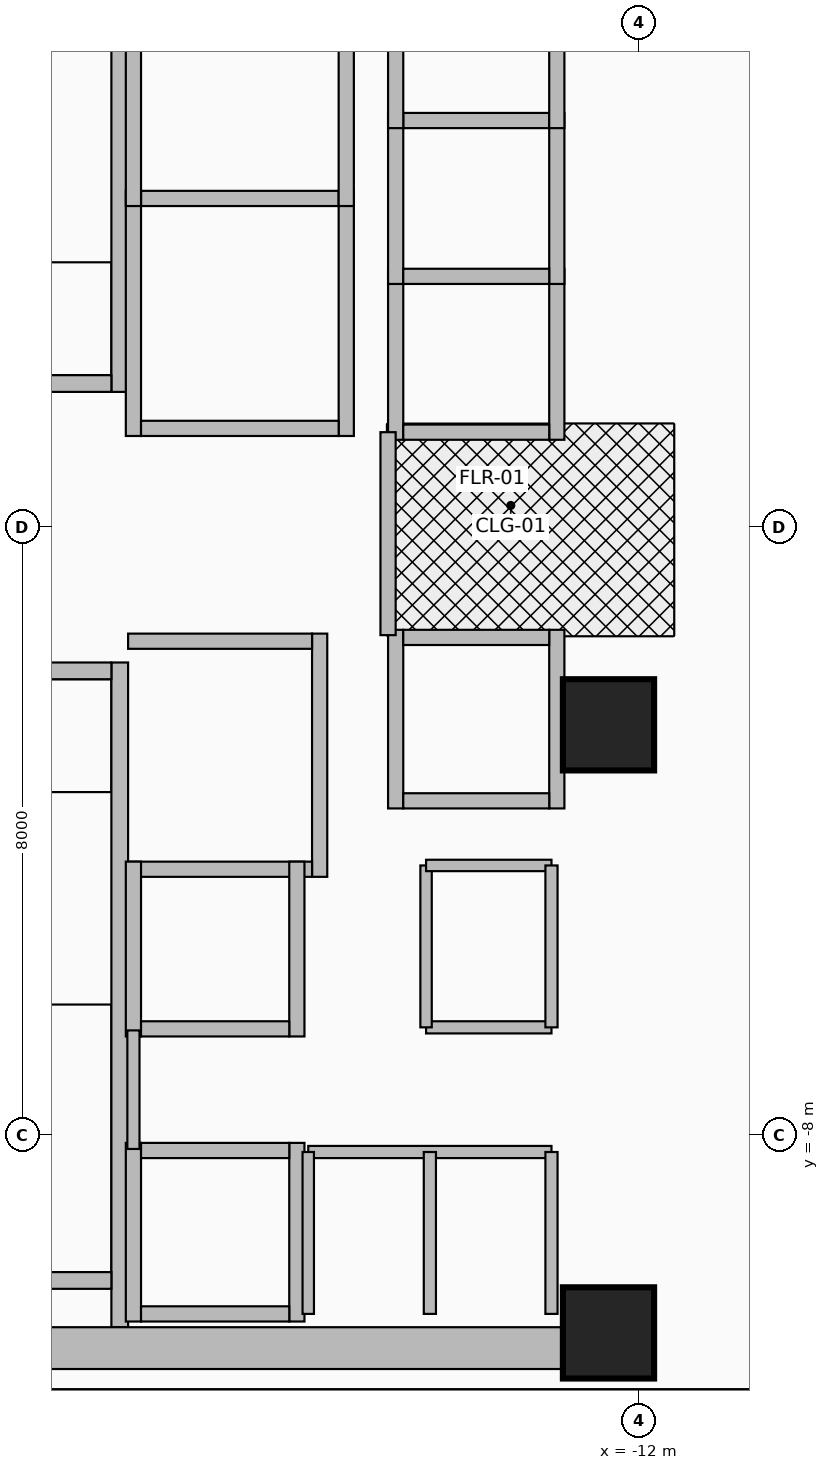
"""IFC4 building model, lengths in metres.
Left out: names, types, materials, properties, quantities, classifications, styles, units other than length and angle.
Written with IfcOpenShell. Run it as: python <this file> out.ifc"""

import sys

from ifc_helpers import new_model, si_unit, direction, frame, frame_2d, origin, origin_2d, place, context, subcontext, project, spatial, rectangle, extrude, source, transform, mapped, element, fill, save


model = new_model("IFC4")
c1 = context("Model", 3, precision=1e-05, world=origin(), true_north=direction((0.0, 1.0)))
c2 = subcontext(c1, "Body", "Model", "MODEL_VIEW")
j1 = project(units=[si_unit("LENGTHUNIT", "METRE"), si_unit("PLANEANGLEUNIT", "RADIAN")], contexts=[c1])
p1 = place(None, origin())
s1 = spatial("IfcSite", under=j1, at=p1, CompositionType="ELEMENT")
p2 = place(p1, origin())
s2 = spatial("IfcBuilding", under=s1, at=p2, CompositionType="ELEMENT")
p3 = place(p2, frame((0.0, 0.0, 153.8)))
s3 = spatial("IfcBuildingStorey", under=s2, at=p3, CompositionType="ELEMENT", Elevation=153.8)
p4 = place(p3, frame((-18.83, 1.78, 0.0), z_axis=(0.0, 0.0, 1.0), x_axis=(0.0, 1.0, 0.0)))
e1 = element("IfcWall", 1, at=p4, inside=s3, PredefinedType="SHEAR", context=c2, shape_type="SweptSolid", body=[
    extrude(rectangle(XDim=8.745, YDim=0.22, at=frame_2d((4.373, 0.0))), origin(), (0.0, 0.0, 1.0), 3.46),
])
p5 = place(p3, frame((-22.05, 1.89, 0.0), z_axis=(0.0, 0.0, 1.0), x_axis=(1.0, 0.0, 0.0)))
e2 = element("IfcWall", 2, at=p5, inside=s3, PredefinedType="SHEAR", context=c2, shape_type="SweptSolid", body=[
    extrude(rectangle(XDim=3.11, YDim=0.22, at=frame_2d((1.555, 0.0))), origin(), (0.0, 0.0, 1.0), 3.46),
])
p6 = place(p5, frame((1.0, 0.0, 0.0)))
e3 = element("IfcOpeningElement", 3, at=p6, cuts=e2, PredefinedType="OPENING", context=c2, shape_type="SweptSolid", body=[
    extrude(rectangle(XDim=1.1, YDim=2.15, at=frame_2d((0.55, 1.075))), frame((0.0, 0.125, 0.0), z_axis=(0.0, -1.0, 0.0), x_axis=(1.0, 0.0, 0.0)), (0.0, 0.0, 1.0), 0.25),
])
p7 = place(p3, frame((-18.83, -10.525, 0.0), z_axis=(0.0, 0.0, 1.0), x_axis=(0.0, 1.0, 0.0)))
e4 = element("IfcWall", 4, at=p7, inside=s3, PredefinedType="SHEAR", context=c2, shape_type="SweptSolid", body=[
    extrude(rectangle(XDim=8.745, YDim=0.22, at=frame_2d((4.373, 0.0))), origin(), (0.0, 0.0, 1.0), 3.46),
])
p8 = place(p3, frame((-22.05, -9.91, 0.0), z_axis=(0.0, 0.0, 1.0), x_axis=(1.0, 0.0, 0.0)))
e5 = element("IfcWall", 5, at=p8, inside=s3, PredefinedType="SHEAR", context=c2, shape_type="SweptSolid", body=[
    extrude(rectangle(XDim=3.11, YDim=0.22, at=frame_2d((1.555, 0.0))), origin(), (0.0, 0.0, 1.0), 3.46),
])
p9 = place(p3, frame((-22.05, -1.89, 0.0), z_axis=(0.0, 0.0, 1.0), x_axis=(1.0, 0.0, 0.0)))
e6 = element("IfcWall", 6, at=p9, inside=s3, PredefinedType="SHEAR", context=c2, shape_type="SweptSolid", body=[
    extrude(rectangle(XDim=3.11, YDim=0.22, at=frame_2d((1.555, 0.0))), origin(), (0.0, 0.0, 1.0), 3.46),
])
p10 = place(p9, frame((1.0, 0.0, 0.0)))
e7 = element("IfcOpeningElement", 7, at=p10, cuts=e6, PredefinedType="OPENING", context=c2, shape_type="SweptSolid", body=[
    extrude(rectangle(XDim=1.1, YDim=2.15, at=frame_2d((0.55, 1.075))), frame((0.0, 0.125, 0.0), z_axis=(0.0, -1.0, 0.0), x_axis=(1.0, 0.0, 0.0)), (0.0, 0.0, 1.0), 0.25),
])
p11 = place(p3, frame((-22.65, -10.8, 0.0), z_axis=(0.0, 0.0, 1.0), x_axis=(1.0, 0.0, 0.0)))
e8 = element("IfcWall", 8, at=p11, inside=s3, PredefinedType="SHEAR", context=c2, shape_type="SweptSolid", body=[
    extrude(rectangle(XDim=10.25, YDim=0.55, at=frame_2d((5.125, 0.0))), origin(), (0.0, 0.0, 1.0), 3.46),
])
m1 = source(origin(), c2, "Body", "SweptSolid", [
    extrude(rectangle(XDim=1.2, YDim=1.2, at=origin_2d()), origin(), (0.0, 0.0, 1.0), 3.7),
])
for number, where, z_axis, x_axis in (
    (9, (-12.4, -10.6, 0.0), (0.0, 0.0, 1.0), (1.0, 0.0, 0.0)),
    (10, (-12.4, -2.6, 0.0), (0.0, 0.0, 1.0), (1.0, 0.0, 0.0)),
):
    element("IfcColumn", number, at=place(p3, frame(where, z_axis=z_axis, x_axis=x_axis)), inside=s3, PredefinedType="COLUMN", context=c2, shape_type="MappedRepresentation", body=[
        mapped(m1, transform((0.0, 0.0, 0.0), x_axis=(1.0, 0.0, 0.0), y_axis=(0.0, 1.0, 0.0), z_axis=(0.0, 0.0, 1.0), scale=1.0)),
    ])
for number, where, z_axis, x_axis in (
    (11, (-18.65, 1.2, 0.0), (0.0, 0.0, 1.0), (0.0, 1.0, 0.0)),
    (12, (-15.85, 1.2, 0.0), (0.0, 0.0, 1.0), (0.0, 1.0, 0.0)),
):
    element("IfcWall", number, at=place(p3, frame(where, z_axis=z_axis, x_axis=x_axis)), inside=s3, PredefinedType="MOVABLE", context=c2, shape_type="SweptSolid", body=[
        extrude(rectangle(XDim=3.225, YDim=0.2, at=frame_2d((1.613, 0.0))), origin(), (0.0, 0.0, 1.0), 3.46),
    ])
p12 = place(p3, frame((-18.55, 1.3, 0.0), z_axis=(0.0, 0.0, 1.0), x_axis=(1.0, 0.0, 0.0)))
e13 = element("IfcWall", 13, at=p12, inside=s3, PredefinedType="MOVABLE", context=c2, shape_type="SweptSolid", body=[
    extrude(rectangle(XDim=2.6, YDim=0.2, at=frame_2d((1.3, 0.0))), origin(), (0.0, 0.0, 1.0), 3.46),
])
p13 = place(p12, frame((0.7, 0.0, 0.0)))
e14 = element("IfcOpeningElement", 14, at=p13, cuts=e13, PredefinedType="OPENING", context=c2, shape_type="SweptSolid", body=[
    extrude(rectangle(XDim=1.2, YDim=2.1, at=frame_2d((0.6, 1.05))), frame((0.0, 0.115, 0.0), z_axis=(0.0, -1.0, 0.0), x_axis=(1.0, 0.0, 0.0)), (0.0, 0.0, 1.0), 0.23),
])
p14 = place(p3, frame((-18.55, 4.325, 0.0), z_axis=(0.0, 0.0, 1.0), x_axis=(1.0, 0.0, 0.0)))
e15 = element("IfcWall", 15, at=p14, inside=s3, PredefinedType="MOVABLE", context=c2, shape_type="SweptSolid", body=[
    extrude(rectangle(XDim=2.6, YDim=0.2, at=frame_2d((1.3, 0.0))), origin(), (0.0, 0.0, 1.0), 3.46),
])
p15 = place(p3, frame((-16.2, -4.6, 0.0), z_axis=(0.0, 0.0, 1.0), x_axis=(0.0, 1.0, 0.0)))
e16 = element("IfcWall", 16, at=p15, inside=s3, PredefinedType="MOVABLE", context=c2, shape_type="SweptSolid", body=[
    extrude(rectangle(XDim=3.2, YDim=0.2, at=frame_2d((1.6, 0.0))), origin(), (0.0, 0.0, 1.0), 3.46),
])
p16 = place(p3, frame((-18.72, -4.5, 0.0), z_axis=(0.0, 0.0, 1.0), x_axis=(1.0, 0.0, 0.0)))
e17 = element("IfcWall", 17, at=p16, inside=s3, PredefinedType="MOVABLE", context=c2, shape_type="SweptSolid", body=[
    extrude(rectangle(XDim=2.42, YDim=0.2, at=frame_2d((1.21, 0.0))), origin(), (0.0, 0.0, 1.0), 3.46),
])
p17 = place(p3, frame((-18.72, -1.5, 0.0), z_axis=(0.0, 0.0, 1.0), x_axis=(1.0, 0.0, 0.0)))
e18 = element("IfcWall", 18, at=p17, inside=s3, PredefinedType="MOVABLE", context=c2, shape_type="SweptSolid", body=[
    extrude(rectangle(XDim=2.42, YDim=0.2, at=frame_2d((1.21, 0.0))), origin(), (0.0, 0.0, 1.0), 3.46),
])
p18 = place(p17, frame((0.61, 0.0, 0.0)))
e19 = element("IfcOpeningElement", 19, at=p18, cuts=e18, PredefinedType="OPENING", context=c2, shape_type="SweptSolid", body=[
    extrude(rectangle(XDim=1.2, YDim=2.1, at=frame_2d((0.6, 1.05))), frame((0.0, 0.115, 0.0), z_axis=(0.0, -1.0, 0.0), x_axis=(1.0, 0.0, 0.0)), (0.0, 0.0, 1.0), 0.23),
])
for number, where, z_axis, x_axis in (
    (20, (-18.65, 4.225, 0.0), (0.0, 0.0, 1.0), (0.0, 1.0, 0.0)),
    (21, (-15.85, 4.225, 0.0), (0.0, 0.0, 1.0), (0.0, 1.0, 0.0)),
):
    element("IfcWall", number, at=place(p3, frame(where, z_axis=z_axis, x_axis=x_axis)), inside=s3, PredefinedType="MOVABLE", context=c2, shape_type="SweptSolid", body=[
        extrude(rectangle(XDim=3.325, YDim=0.2, at=frame_2d((1.663, 0.0))), origin(), (0.0, 0.0, 1.0), 3.46),
    ])
for number, where, z_axis, x_axis in (
    (22, (-18.65, -10.45, 0.0), (0.0, 0.0, 1.0), (0.0, 1.0, 0.0)),
    (23, (-16.5, -10.45, 0.0), (0.0, 0.0, 1.0), (0.0, 1.0, 0.0)),
):
    element("IfcWall", number, at=place(p3, frame(where, z_axis=z_axis, x_axis=x_axis)), inside=s3, PredefinedType="MOVABLE", context=c2, shape_type="SweptSolid", body=[
        extrude(rectangle(XDim=2.35, YDim=0.2, at=frame_2d((1.175, 0.0))), origin(), (0.0, 0.0, 1.0), 2.666),
    ])
p19 = place(p3, frame((-18.55, -10.35, 0.0), z_axis=(0.0, 0.0, 1.0), x_axis=(1.0, 0.0, 0.0)))
e24 = element("IfcWall", 24, at=p19, inside=s3, PredefinedType="MOVABLE", context=c2, shape_type="SweptSolid", body=[
    extrude(rectangle(XDim=1.95, YDim=0.2, at=frame_2d((0.975, 0.0))), origin(), (0.0, 0.0, 1.0), 2.666),
])
p20 = place(p3, frame((-18.55, -8.2, 0.0), z_axis=(0.0, 0.0, 1.0), x_axis=(1.0, 0.0, 0.0)))
e25 = element("IfcWall", 25, at=p20, inside=s3, PredefinedType="MOVABLE", context=c2, shape_type="SweptSolid", body=[
    extrude(rectangle(XDim=1.95, YDim=0.2, at=frame_2d((0.975, 0.0))), origin(), (0.0, 0.0, 1.0), 3.46),
])
p21 = place(p20, frame((0.425, 0.0, 0.0)))
e26 = element("IfcOpeningElement", 26, at=p21, cuts=e25, PredefinedType="OPENING", context=c2, shape_type="SweptSolid", body=[
    extrude(rectangle(XDim=1.1, YDim=2.1, at=frame_2d((0.55, 1.05))), frame((0.0, 0.115, 0.0), z_axis=(0.0, -1.0, 0.0), x_axis=(1.0, 0.0, 0.0)), (0.0, 0.0, 1.0), 0.23),
])
p22 = place(p3, frame((-15.2, 1.15, 0.0), z_axis=(0.0, 0.0, 1.0), x_axis=(0.0, 1.0, 0.0)))
e27 = element("IfcWall", 27, at=p22, inside=s3, PredefinedType="MOVABLE", context=c2, shape_type="SweptSolid", body=[
    extrude(rectangle(XDim=2.25, YDim=0.2, at=frame_2d((1.125, 0.0))), origin(), (0.0, 0.0, 1.0), 3.46),
])
p23 = place(p3, frame((-13.08, 1.15, 0.0), z_axis=(0.0, 0.0, 1.0), x_axis=(0.0, 1.0, 0.0)))
e28 = element("IfcWall", 28, at=p23, inside=s3, PredefinedType="MOVABLE", context=c2, shape_type="SweptSolid", body=[
    extrude(rectangle(XDim=2.25, YDim=0.2, at=frame_2d((1.125, 0.0))), origin(), (0.0, 0.0, 1.0), 3.46),
])
p24 = place(p23, frame((0.575, 0.0, 0.0)))
e29 = element("IfcOpeningElement", 29, at=p24, cuts=e28, PredefinedType="OPENING", context=c2, shape_type="SweptSolid", body=[
    extrude(rectangle(XDim=1.1, YDim=2.1, at=frame_2d((0.55, 1.05))), frame((0.0, 0.115, 0.0), z_axis=(0.0, -1.0, 0.0), x_axis=(1.0, 0.0, 0.0)), (0.0, 0.0, 1.0), 0.23),
])
p25 = place(p3, frame((-15.1, 1.25, 0.0), z_axis=(0.0, 0.0, 1.0), x_axis=(1.0, 0.0, 0.0)))
e30 = element("IfcWall", 30, at=p25, inside=s3, PredefinedType="MOVABLE", context=c2, shape_type="SweptSolid", body=[
    extrude(rectangle(XDim=1.92, YDim=0.2, at=frame_2d((0.96, 0.0))), origin(), (0.0, 0.0, 1.0), 3.46),
])
for number, where, z_axis, x_axis in (
    (31, (-15.2, 3.2, 0.0), (0.0, 0.0, 1.0), (0.0, 1.0, 0.0)),
    (32, (-13.08, 3.2, 0.0), (0.0, 0.0, 1.0), (0.0, 1.0, 0.0)),
):
    element("IfcWall", number, at=place(p3, frame(where, z_axis=z_axis, x_axis=x_axis)), inside=s3, PredefinedType="MOVABLE", context=c2, shape_type="SweptSolid", body=[
        extrude(rectangle(XDim=2.25, YDim=0.2, at=frame_2d((1.125, 0.0))), origin(), (0.0, 0.0, 1.0), 3.46),
    ])
for number, where, z_axis, x_axis in (
    (33, (-15.1, 3.3, 0.0), (0.0, 0.0, 1.0), (1.0, 0.0, 0.0)),
    (34, (-15.1, 5.35, 0.0), (0.0, 0.0, 1.0), (1.0, 0.0, 0.0)),
):
    element("IfcWall", number, at=place(p3, frame(where, z_axis=z_axis, x_axis=x_axis)), inside=s3, PredefinedType="MOVABLE", context=c2, shape_type="SweptSolid", body=[
        extrude(rectangle(XDim=1.92, YDim=0.2, at=frame_2d((0.96, 0.0))), origin(), (0.0, 0.0, 1.0), 3.46),
    ])
for number, where, z_axis, x_axis in (
    (35, (-15.2, 5.25, 0.0), (0.0, 0.0, 1.0), (0.0, 1.0, 0.0)),
    (36, (-13.08, 5.25, 0.0), (0.0, 0.0, 1.0), (0.0, 1.0, 0.0)),
):
    element("IfcWall", number, at=place(p3, frame(where, z_axis=z_axis, x_axis=x_axis)), inside=s3, PredefinedType="MOVABLE", context=c2, shape_type="SweptSolid", body=[
        extrude(rectangle(XDim=2.25, YDim=0.2, at=frame_2d((1.125, 0.0))), origin(), (0.0, 0.0, 1.0), 3.46),
    ])
for number, where, z_axis, x_axis in (
    (37, (-18.65, -6.7, 0.0), (0.0, 0.0, 1.0), (0.0, 1.0, 0.0)),
    (38, (-16.5, -6.7, 0.0), (0.0, 0.0, 1.0), (0.0, 1.0, 0.0)),
):
    element("IfcWall", number, at=place(p3, frame(where, z_axis=z_axis, x_axis=x_axis)), inside=s3, PredefinedType="MOVABLE", context=c2, shape_type="SweptSolid", body=[
        extrude(rectangle(XDim=2.3, YDim=0.2, at=frame_2d((1.15, 0.0))), origin(), (0.0, 0.0, 1.0), 3.46),
    ])
p26 = place(p3, frame((-18.55, -6.6, 0.0), z_axis=(0.0, 0.0, 1.0), x_axis=(1.0, 0.0, 0.0)))
e39 = element("IfcWall", 39, at=p26, inside=s3, PredefinedType="MOVABLE", context=c2, shape_type="SweptSolid", body=[
    extrude(rectangle(XDim=1.95, YDim=0.2, at=frame_2d((0.975, 0.0))), origin(), (0.0, 0.0, 1.0), 3.46),
])
for number, where, z_axis, x_axis in (
    (40, (-15.2, -3.7, 0.0), (0.0, 0.0, 1.0), (0.0, 1.0, 0.0)),
    (41, (-13.08, -3.7, 0.0), (0.0, 0.0, 1.0), (0.0, 1.0, 0.0)),
):
    element("IfcWall", number, at=place(p3, frame(where, z_axis=z_axis, x_axis=x_axis)), inside=s3, PredefinedType="MOVABLE", context=c2, shape_type="SweptSolid", body=[
        extrude(rectangle(XDim=2.35, YDim=0.2, at=frame_2d((1.175, 0.0))), origin(), (0.0, 0.0, 1.0), 3.46),
    ])
for number, where, z_axis, x_axis in (
    (42, (-15.1, -3.6, 0.0), (0.0, 0.0, 1.0), (1.0, 0.0, 0.0)),
    (43, (-15.1, -1.45, 0.0), (0.0, 0.0, 1.0), (1.0, 0.0, 0.0)),
):
    element("IfcWall", number, at=place(p3, frame(where, z_axis=z_axis, x_axis=x_axis)), inside=s3, PredefinedType="MOVABLE", context=c2, shape_type="SweptSolid", body=[
        extrude(rectangle(XDim=1.92, YDim=0.2, at=frame_2d((0.96, 0.0))), origin(), (0.0, 0.0, 1.0), 3.46),
    ])
p27 = place(p3, frame((-15.3, -1.42, 0.0), z_axis=(0.0, 0.0, 1.0), x_axis=(0.0, 1.0, 0.0)))
e44 = element("IfcWall", 44, at=p27, inside=s3, PredefinedType="PARTITIONING", context=c2, shape_type="SweptSolid", body=[
    extrude(rectangle(XDim=2.67, YDim=0.2, at=frame_2d((1.335, 0.0))), origin(), (0.0, 0.0, 1.0), 3.46),
])
p28 = place(p27, frame((0.78, 0.0, 0.0)))
e45 = element("IfcOpeningElement", 45, at=p28, cuts=e44, PredefinedType="OPENING", context=c2, shape_type="SweptSolid", body=[
    extrude(rectangle(XDim=1.05, YDim=2.15, at=frame_2d((0.525, 1.075))), frame((0.0, 0.115, 0.0), z_axis=(0.0, -1.0, 0.0), x_axis=(1.0, 0.0, 0.0)), (0.0, 0.0, 1.0), 0.23),
])
p29 = place(p3, frame((-18.65, -8.18, 0.0), z_axis=(0.0, 0.0, 1.0), x_axis=(0.0, 1.0, 0.0)))
e46 = element("IfcWall", 46, at=p29, inside=s3, PredefinedType="PARTITIONING", context=c2, shape_type="SweptSolid", body=[
    extrude(rectangle(XDim=1.56, YDim=0.16, at=frame_2d((0.78, 0.0))), origin(), (0.0, 0.0, 1.0), 3.46),
])
p30 = place(p3, frame((-16.35, -8.22, 0.0), z_axis=(0.0, 0.0, 1.0), x_axis=(1.0, 0.0, 0.0)))
e47 = element("IfcWall", 47, at=p30, inside=s3, PredefinedType="PARTITIONING", context=c2, shape_type="SweptSolid", body=[
    extrude(rectangle(XDim=3.2, YDim=0.16, at=frame_2d((1.6, 0.0))), origin(), (0.0, 0.0, 1.0), 3.46),
])
p31 = place(p30, frame((0.35, 0.0, 0.0)))
e48 = element("IfcOpeningElement", 48, at=p31, cuts=e47, PredefinedType="OPENING", context=c2, shape_type="SweptSolid", body=[
    extrude(rectangle(XDim=0.85, YDim=2.05, at=frame_2d((0.425, 1.025))), frame((0.0, 0.095, 0.0), z_axis=(0.0, -1.0, 0.0), x_axis=(1.0, 0.0, 0.0)), (0.0, 0.0, 1.0), 0.19),
])
p32 = place(p30, frame((1.95, 0.0, 0.0)))
e49 = element("IfcOpeningElement", 49, at=p32, cuts=e47, PredefinedType="OPENING", context=c2, shape_type="SweptSolid", body=[
    extrude(rectangle(XDim=0.85, YDim=2.05, at=frame_2d((0.425, 1.025))), frame((0.0, 0.095, 0.0), z_axis=(0.0, -1.0, 0.0), x_axis=(1.0, 0.0, 0.0)), (0.0, 0.0, 1.0), 0.19),
])
p33 = place(p3, frame((-16.35, -10.35, 0.0), z_axis=(0.0, 0.0, 1.0), x_axis=(0.0, 1.0, 0.0)))
e50 = element("IfcWall", 50, at=p33, inside=s3, PredefinedType="PARTITIONING", context=c2, shape_type="SweptSolid", body=[
    extrude(rectangle(XDim=2.13, YDim=0.15, at=frame_2d((1.065, 0.0))), origin(), (0.0, 0.0, 1.0), 3.46),
])
for number, where, z_axis, x_axis in (
    (51, (-13.15, -10.35, 0.0), (0.0, 0.0, 1.0), (0.0, 1.0, 0.0)),
    (52, (-14.75, -10.35, 0.0), (0.0, 0.0, 1.0), (0.0, 1.0, 0.0)),
):
    element("IfcWall", number, at=place(p3, frame(where, z_axis=z_axis, x_axis=x_axis)), inside=s3, PredefinedType="PARTITIONING", context=c2, shape_type="SweptSolid", body=[
        extrude(rectangle(XDim=2.13, YDim=0.16, at=frame_2d((1.065, 0.0))), origin(), (0.0, 0.0, 1.0), 3.46),
    ])
p34 = place(p3, frame((-14.8, -6.58, 0.0), z_axis=(0.0, 0.0, 1.0), x_axis=(1.0, 0.0, 0.0)))
e53 = element("IfcWall", 53, at=p34, inside=s3, PredefinedType="PARTITIONING", context=c2, shape_type="SweptSolid", body=[
    extrude(rectangle(XDim=1.65, YDim=0.16, at=frame_2d((0.825, 0.0))), origin(), (0.0, 0.0, 1.0), 3.46),
])
p35 = place(p34, frame((0.5, 0.0, 0.0)))
e54 = element("IfcOpeningElement", 54, at=p35, cuts=e53, PredefinedType="OPENING", context=c2, shape_type="SweptSolid", body=[
    extrude(rectangle(XDim=0.85, YDim=2.05, at=frame_2d((0.425, 1.025))), frame((0.0, 0.095, 0.0), z_axis=(0.0, -1.0, 0.0), x_axis=(1.0, 0.0, 0.0)), (0.0, 0.0, 1.0), 0.19),
])
p36 = place(p3, frame((-14.8, -6.58, 0.0), z_axis=(0.0, 0.0, 1.0), x_axis=(0.0, 1.0, 0.0)))
e55 = element("IfcWall", 55, at=p36, inside=s3, PredefinedType="PARTITIONING", context=c2, shape_type="SweptSolid", body=[
    extrude(rectangle(XDim=2.13, YDim=0.15, at=frame_2d((1.065, 0.0))), origin(), (0.0, 0.0, 1.0), 3.46),
])
p37 = place(p3, frame((-14.8, -4.45, 0.0), z_axis=(0.0, 0.0, 1.0), x_axis=(1.0, 0.0, 0.0)))
e56 = element("IfcWall", 56, at=p37, inside=s3, PredefinedType="PARTITIONING", context=c2, shape_type="SweptSolid", body=[
    extrude(rectangle(XDim=1.65, YDim=0.15, at=frame_2d((0.825, 0.0))), origin(), (0.0, 0.0, 1.0), 3.46),
])
p38 = place(p3, frame((-13.15, -6.58, 0.0), z_axis=(0.0, 0.0, 1.0), x_axis=(0.0, 1.0, 0.0)))
e57 = element("IfcWall", 57, at=p38, inside=s3, PredefinedType="PARTITIONING", context=c2, shape_type="SweptSolid", body=[
    extrude(rectangle(XDim=2.13, YDim=0.16, at=frame_2d((1.065, 0.0))), origin(), (0.0, 0.0, 1.0), 3.46),
])
p39 = place(p3, frame((-23.45, -11.42, 0.0), z_axis=(0.0, 0.0, 1.0), x_axis=(1.0, 0.0, 0.0)))
e58 = element("IfcWall", 58, at=p39, inside=s3, PredefinedType="PARTITIONING", context=c2, shape_type="SweptSolid", body=[
    extrude(rectangle(XDim=13.84, YDim=0.16, at=frame_2d((6.92, 0.0))), origin(), (0.0, 0.0, 1.0), 2.834),
])
p40 = place(p13, origin())
e59 = element("IfcDoor", 59, at=p40, inside=s3, OperationType="DOUBLE_DOOR_SLIDING", PredefinedType="DOOR", context=c2, shape_type="SweptSolid", body=[
    extrude(rectangle(XDim=1.2, YDim=2.1, at=frame_2d((0.6, 1.05))), frame((0.0, 0.025, 0.0), z_axis=(0.0, -1.0, 0.0), x_axis=(1.0, 0.0, 0.0)), (0.0, 0.0, 1.0), 0.05),
])
fill(e14, e59)
p41 = place(p18, origin())
e60 = element("IfcDoor", 60, at=p41, inside=s3, OperationType="DOUBLE_DOOR_SLIDING", PredefinedType="DOOR", context=c2, shape_type="SweptSolid", body=[
    extrude(rectangle(XDim=1.2, YDim=2.1, at=frame_2d((0.6, 1.05))), frame((0.0, 0.025, 0.0), z_axis=(0.0, -1.0, 0.0), x_axis=(1.0, 0.0, 0.0)), (0.0, 0.0, 1.0), 0.05),
])
fill(e19, e60)
p42 = place(p21, origin())
e61 = element("IfcDoor", 61, at=p42, inside=s3, OperationType="DOUBLE_DOOR_SLIDING", PredefinedType="DOOR", context=c2, shape_type="SweptSolid", body=[
    extrude(rectangle(XDim=1.1, YDim=2.1, at=frame_2d((0.55, 1.05))), frame((0.0, 0.025, 0.0), z_axis=(0.0, -1.0, 0.0), x_axis=(1.0, 0.0, 0.0)), (0.0, 0.0, 1.0), 0.05),
])
fill(e26, e61)
p43 = place(p24, origin())
e62 = element("IfcDoor", 62, at=p43, inside=s3, OperationType="DOUBLE_DOOR_SLIDING", PredefinedType="DOOR", context=c2, shape_type="SweptSolid", body=[
    extrude(rectangle(XDim=1.1, YDim=2.1, at=frame_2d((0.55, 1.05))), frame((0.0, 0.025, 0.0), z_axis=(0.0, -1.0, 0.0), x_axis=(1.0, 0.0, 0.0)), (0.0, 0.0, 1.0), 0.05),
])
fill(e29, e62)
p44 = place(p28, origin())
e63 = element("IfcDoor", 63, at=p44, inside=s3, OperationType="SINGLE_SWING_RIGHT", PredefinedType="DOOR", context=c2, shape_type="SweptSolid", body=[
    extrude(rectangle(XDim=1.05, YDim=2.15, at=frame_2d((0.525, 1.075))), frame((0.0, 0.025, 0.0), z_axis=(0.0, -1.0, 0.0), x_axis=(1.0, 0.0, 0.0)), (0.0, 0.0, 1.0), 0.05),
])
fill(e45, e63)
p45 = place(p31, origin())
e64 = element("IfcDoor", 64, at=p45, inside=s3, OperationType="SINGLE_SWING_LEFT", PredefinedType="DOOR", context=c2, shape_type="SweptSolid", body=[
    extrude(rectangle(XDim=0.85, YDim=2.05, at=frame_2d((0.425, 1.025))), frame((0.0, 0.025, 0.0), z_axis=(0.0, -1.0, 0.0), x_axis=(1.0, 0.0, 0.0)), (0.0, 0.0, 1.0), 0.05),
])
fill(e48, e64)
p46 = place(p32, origin())
e65 = element("IfcDoor", 65, at=p46, inside=s3, OperationType="SINGLE_SWING_RIGHT", PredefinedType="DOOR", context=c2, shape_type="SweptSolid", body=[
    extrude(rectangle(XDim=0.85, YDim=2.05, at=frame_2d((0.425, 1.025))), frame((0.0, 0.025, 0.0), z_axis=(0.0, -1.0, 0.0), x_axis=(1.0, 0.0, 0.0)), (0.0, 0.0, 1.0), 0.05),
])
fill(e49, e65)
p47 = place(p35, origin())
e66 = element("IfcDoor", 66, at=p47, inside=s3, OperationType="SINGLE_SWING_LEFT", PredefinedType="DOOR", context=c2, shape_type="SweptSolid", body=[
    extrude(rectangle(XDim=0.85, YDim=2.05, at=frame_2d((0.425, 1.025))), frame((0.0, 0.025, 0.0), z_axis=(0.0, -1.0, 0.0), x_axis=(1.0, 0.0, 0.0)), (0.0, 0.0, 1.0), 0.05),
])
fill(e54, e66)
save(model, sys.argv[1])
